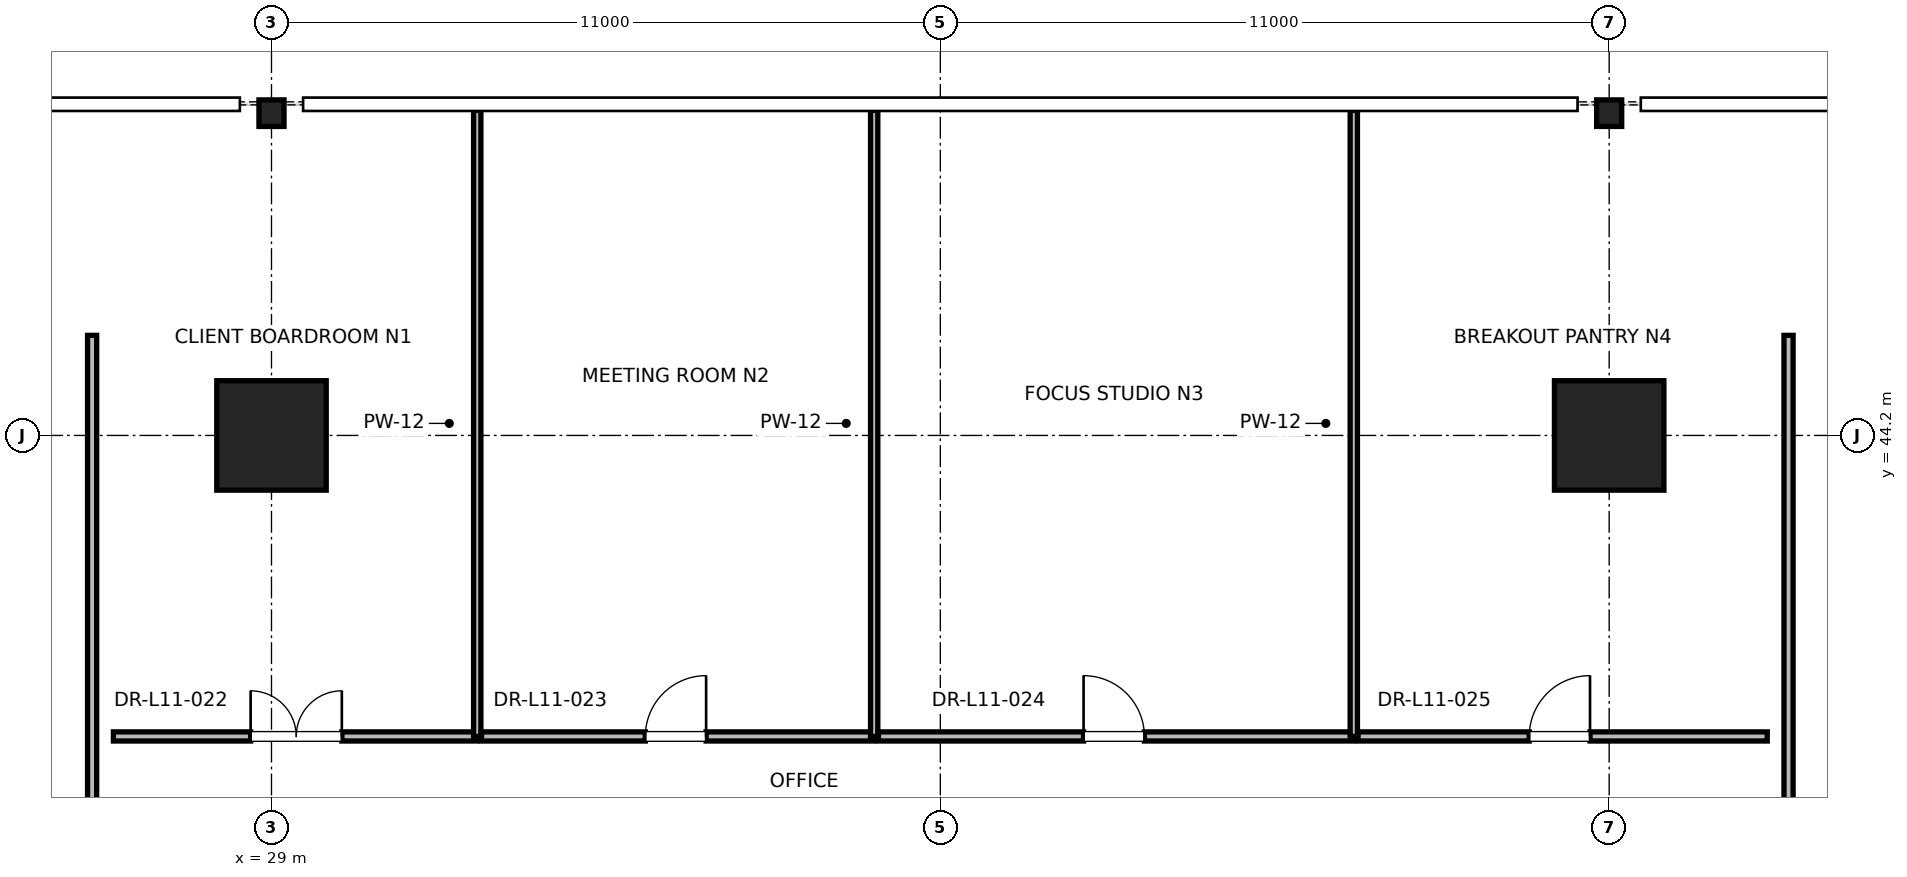
"""IFC4 building model, lengths in metres.
Left out: names, types, materials, properties, quantities, classifications, styles, units other than length and angle.
Written with IfcOpenShell. Run it as: python <this file> out.ifc"""

import sys

from ifc_helpers import new_model, si_unit, direction, frame, frame_2d, origin, origin_2d, place, context, subcontext, project, spatial, rectangle, i_section, extrude, element, fill, save


model = new_model("IFC4")
c1 = context("Model", 3, precision=1e-05, world=origin(), true_north=direction((0.0, 1.0)))
c2 = subcontext(c1, "Body", "Model", "MODEL_VIEW")
j1 = project(units=[si_unit("LENGTHUNIT", "METRE"), si_unit("PLANEANGLEUNIT", "RADIAN")], contexts=[c1])
p1 = place(None, origin())
s1 = spatial("IfcSite", under=j1, at=p1, CompositionType="ELEMENT")
p2 = place(p1, origin())
s2 = spatial("IfcBuilding", under=s1, at=p2, CompositionType="ELEMENT")
p3 = place(p2, frame((0.0, 0.0, 51.6)))
s3 = spatial("IfcBuildingStorey", under=s2, at=p3, CompositionType="ELEMENT", Elevation=51.6)
for number, where, z_axis, x_axis in (
    (1, (29.0, 44.2, 0.0), (0.0, 0.0, 1.0), (1.0, 0.0, 0.0)),
    (2, (51.0, 44.2, 0.0), (0.0, 0.0, 1.0), (1.0, 0.0, 0.0)),
):
    element("IfcColumn", number, at=place(p3, frame(where, z_axis=z_axis, x_axis=x_axis)), inside=s3, PredefinedType="COLUMN", context=c2, shape_type="SweptSolid", body=[
        extrude(rectangle(XDim=1.8, YDim=1.8, at=origin_2d()), origin(), (0.0, 0.0, 1.0), 4.0),
    ])
for number, where, z_axis, x_axis in (
    (3, (29.0, 49.5, 0.0), (0.0, 0.0, 1.0), (1.0, 0.0, 0.0)),
    (4, (51.0, 49.5, 0.0), (0.0, 0.0, 1.0), (1.0, 0.0, 0.0)),
):
    element("IfcColumn", number, at=place(p3, frame(where, z_axis=z_axis, x_axis=x_axis)), inside=s3, PredefinedType="COLUMN", context=c2, shape_type="SweptSolid", body=[
        extrude(i_section(OverallWidth=0.412, OverallDepth=0.437, WebThickness=0.036, FlangeThickness=0.058, FilletRadius=0.015, at=origin_2d()), origin(), (0.0, 0.0, 1.0), 4.0),
    ])
p4 = place(p3, frame((26.4, 39.25, 0.0), z_axis=(0.0, 0.0, 1.0), x_axis=(1.0, 0.0, 0.0)))
e5 = element("IfcWall", 5, at=p4, inside=s3, PredefinedType="PARTITIONING", context=c2, shape_type="SweptSolid", body=[
    extrude(rectangle(XDim=5.984, YDim=0.15, at=frame_2d((2.992, 0.0))), origin(), (0.0, 0.0, 1.0), 2.85),
])
p5 = place(p4, frame((2.257, 0.0, 0.0)))
e6 = element("IfcOpeningElement", 6, at=p5, cuts=e5, PredefinedType="OPENING", context=c2, shape_type="SweptSolid", body=[
    extrude(rectangle(XDim=1.5, YDim=2.25, at=frame_2d((0.75, 1.125))), frame((0.0, 0.075, 0.0), z_axis=(0.0, -1.0, 0.0), x_axis=(1.0, 0.0, 0.0)), (0.0, 0.0, 1.0), 0.15),
])
p6 = place(p3, frame((32.384, 39.25, 0.0), z_axis=(0.0, 0.0, 1.0), x_axis=(0.0, 1.0, 0.0)))
e7 = element("IfcWall", 7, at=p6, inside=s3, PredefinedType="PARTITIONING", context=c2, shape_type="SweptSolid", body=[
    extrude(rectangle(XDim=10.296, YDim=0.12, at=frame_2d((5.148, 0.0))), origin(), (0.0, 0.0, 1.0), 2.39),
])
p7 = place(p3, frame((32.454, 39.25, 0.0), z_axis=(0.0, 0.0, 1.0), x_axis=(1.0, 0.0, 0.0)))
e8 = element("IfcWall", 8, at=p7, inside=s3, PredefinedType="PARTITIONING", context=c2, shape_type="SweptSolid", body=[
    extrude(rectangle(XDim=6.458, YDim=0.15, at=frame_2d((3.229, 0.0))), origin(), (0.0, 0.0, 1.0), 2.85),
])
p8 = place(p7, frame((2.694, 0.0, 0.0)))
e9 = element("IfcOpeningElement", 9, at=p8, cuts=e8, PredefinedType="OPENING", context=c2, shape_type="SweptSolid", body=[
    extrude(rectangle(XDim=1.0, YDim=2.15, at=frame_2d((0.5, 1.075))), frame((0.0, 0.075, 0.0), z_axis=(0.0, -1.0, 0.0), x_axis=(1.0, 0.0, 0.0)), (0.0, 0.0, 1.0), 0.15),
])
p9 = place(p3, frame((38.912, 39.25, 0.0), z_axis=(0.0, 0.0, 1.0), x_axis=(0.0, 1.0, 0.0)))
e10 = element("IfcWall", 10, at=p9, inside=s3, PredefinedType="PARTITIONING", context=c2, shape_type="SweptSolid", body=[
    extrude(rectangle(XDim=10.296, YDim=0.12, at=frame_2d((5.148, 0.0))), origin(), (0.0, 0.0, 1.0), 2.39),
])
p10 = place(p3, frame((38.982, 39.25, 0.0), z_axis=(0.0, 0.0, 1.0), x_axis=(1.0, 0.0, 0.0)))
e11 = element("IfcWall", 11, at=p10, inside=s3, PredefinedType="PARTITIONING", context=c2, shape_type="SweptSolid", body=[
    extrude(rectangle(XDim=7.818, YDim=0.15, at=frame_2d((3.909, 0.0))), origin(), (0.0, 0.0, 1.0), 2.85),
])
p11 = place(p10, frame((3.374, 0.0, 0.0)))
e12 = element("IfcOpeningElement", 12, at=p11, cuts=e11, PredefinedType="OPENING", context=c2, shape_type="SweptSolid", body=[
    extrude(rectangle(XDim=1.0, YDim=2.15, at=frame_2d((0.5, 1.075))), frame((0.0, 0.075, 0.0), z_axis=(0.0, -1.0, 0.0), x_axis=(1.0, 0.0, 0.0)), (0.0, 0.0, 1.0), 0.15),
])
p12 = place(p3, frame((46.8, 39.25, 0.0), z_axis=(0.0, 0.0, 1.0), x_axis=(0.0, 1.0, 0.0)))
e13 = element("IfcWall", 13, at=p12, inside=s3, PredefinedType="PARTITIONING", context=c2, shape_type="SweptSolid", body=[
    extrude(rectangle(XDim=10.296, YDim=0.12, at=frame_2d((5.148, 0.0))), origin(), (0.0, 0.0, 1.0), 2.39),
])
p13 = place(p3, frame((46.87, 39.25, 0.0), z_axis=(0.0, 0.0, 1.0), x_axis=(1.0, 0.0, 0.0)))
e14 = element("IfcWall", 14, at=p13, inside=s3, PredefinedType="PARTITIONING", context=c2, shape_type="SweptSolid", body=[
    extrude(rectangle(XDim=6.73, YDim=0.15, at=frame_2d((3.365, 0.0))), origin(), (0.0, 0.0, 1.0), 2.85),
])
p14 = place(p13, frame((2.815, 0.0, 0.0)))
e15 = element("IfcOpeningElement", 15, at=p14, cuts=e14, PredefinedType="OPENING", context=c2, shape_type="SweptSolid", body=[
    extrude(rectangle(XDim=1.0, YDim=2.15, at=frame_2d((0.5, 1.075))), frame((0.0, 0.075, 0.0), z_axis=(0.0, -1.0, 0.0), x_axis=(1.0, 0.0, 0.0)), (0.0, 0.0, 1.0), 0.15),
])
p15 = place(p3, frame((26.05, 30.505, 0.0), z_axis=(0.0, 0.0, 1.0), x_axis=(0.0, 1.0, 0.0)))
e16 = element("IfcWall", 16, at=p15, inside=s3, PredefinedType="PARTITIONING", context=c2, shape_type="SweptSolid", body=[
    extrude(rectangle(XDim=15.341, YDim=0.15, at=frame_2d((7.67, 0.0))), origin(), (0.0, 0.0, 1.0), 2.85),
])
p16 = place(p15, frame((2.422, 0.0, 0.0)))
e17 = element("IfcOpeningElement", 17, at=p16, cuts=e16, PredefinedType="OPENING", context=c2, shape_type="SweptSolid", body=[
    extrude(rectangle(XDim=1.05, YDim=2.2, at=frame_2d((0.525, 1.1))), frame((0.0, 0.075, 0.0), z_axis=(0.0, -1.0, 0.0), x_axis=(1.0, 0.0, 0.0)), (0.0, 0.0, 1.0), 0.15),
])
p17 = place(p3, frame((53.95, 31.973, 0.0), z_axis=(0.0, 0.0, 1.0), x_axis=(0.0, 1.0, 0.0)))
e18 = element("IfcWall", 18, at=p17, inside=s3, PredefinedType="PARTITIONING", context=c2, shape_type="SweptSolid", body=[
    extrude(rectangle(XDim=13.873, YDim=0.15, at=frame_2d((6.937, 0.0))), origin(), (0.0, 0.0, 1.0), 2.85),
])
p18 = place(p17, frame((1.713, 0.0, 0.0)))
e19 = element("IfcOpeningElement", 19, at=p18, cuts=e18, PredefinedType="OPENING", context=c2, shape_type="SweptSolid", body=[
    extrude(rectangle(XDim=1.0, YDim=2.15, at=frame_2d((0.5, 1.075))), frame((0.0, 0.075, 0.0), z_axis=(0.0, -1.0, 0.0), x_axis=(1.0, 0.0, 0.0)), (0.0, 0.0, 1.0), 0.15),
])
p19 = place(p5, origin())
e20 = element("IfcDoor", 20, at=p19, inside=s3, OperationType="DOUBLE_DOOR_SINGLE_SWING", PredefinedType="DOOR", context=c2, shape_type="SweptSolid", body=[
    extrude(rectangle(XDim=1.5, YDim=2.25, at=frame_2d((0.75, 1.125))), frame((0.0, 0.025, 0.0), z_axis=(0.0, -1.0, 0.0), x_axis=(1.0, 0.0, 0.0)), (0.0, 0.0, 1.0), 0.05),
])
fill(e6, e20)
p20 = place(p8, origin())
e21 = element("IfcDoor", 21, at=p20, inside=s3, OperationType="SINGLE_SWING_RIGHT", PredefinedType="DOOR", context=c2, shape_type="SweptSolid", body=[
    extrude(rectangle(XDim=1.0, YDim=2.15, at=frame_2d((0.5, 1.075))), frame((0.0, 0.025, 0.0), z_axis=(0.0, -1.0, 0.0), x_axis=(1.0, 0.0, 0.0)), (0.0, 0.0, 1.0), 0.05),
])
fill(e9, e21)
p21 = place(p11, origin())
e22 = element("IfcDoor", 22, at=p21, inside=s3, OperationType="SINGLE_SWING_LEFT", PredefinedType="DOOR", context=c2, shape_type="SweptSolid", body=[
    extrude(rectangle(XDim=1.0, YDim=2.15, at=frame_2d((0.5, 1.075))), frame((0.0, 0.025, 0.0), z_axis=(0.0, -1.0, 0.0), x_axis=(1.0, 0.0, 0.0)), (0.0, 0.0, 1.0), 0.05),
])
fill(e12, e22)
p22 = place(p14, origin())
e23 = element("IfcDoor", 23, at=p22, inside=s3, OperationType="SINGLE_SWING_RIGHT", PredefinedType="DOOR", context=c2, shape_type="SweptSolid", body=[
    extrude(rectangle(XDim=1.0, YDim=2.15, at=frame_2d((0.5, 1.075))), frame((0.0, 0.025, 0.0), z_axis=(0.0, -1.0, 0.0), x_axis=(1.0, 0.0, 0.0)), (0.0, 0.0, 1.0), 0.05),
])
fill(e15, e23)
save(model, sys.argv[1])
